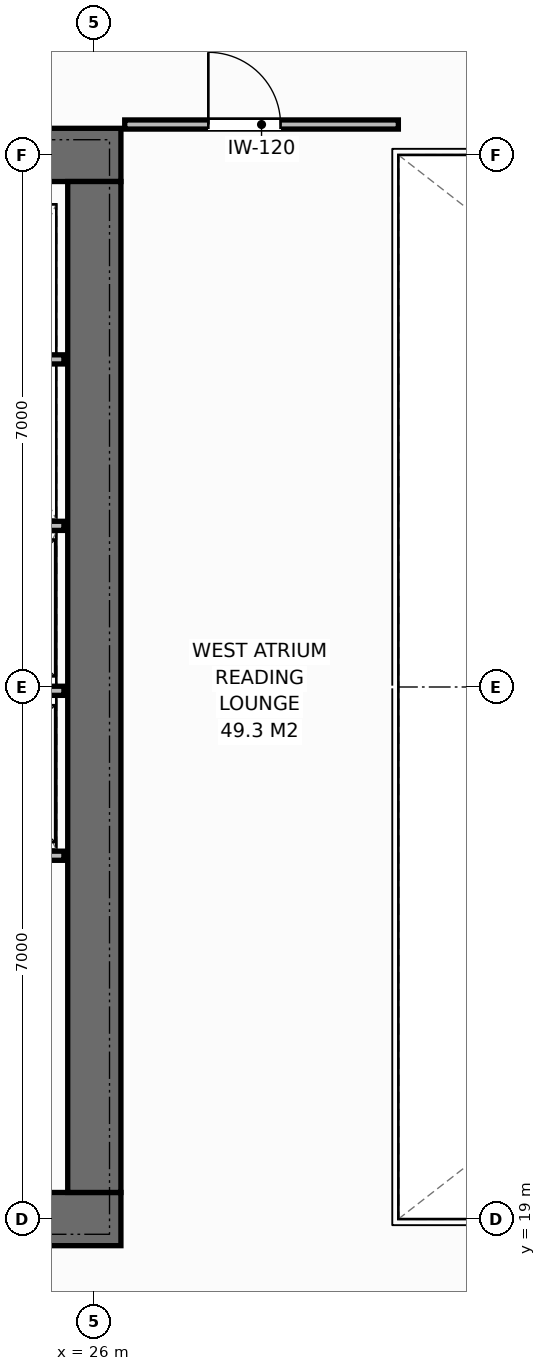
"""IFC4 building model, lengths in metres.
Left out: names, types, materials, properties, quantities, classifications, styles, units other than length and angle.
Written with IfcOpenShell. Run it as: python <this file> out.ifc"""

import sys

from ifc_helpers import new_model, si_unit, direction, frame, frame_2d, origin, place, context, subcontext, project, spatial, rectangle, extrude, element, fill, save


model = new_model("IFC4")
c1 = context("Model", 3, precision=1e-05, world=origin(), true_north=direction((0.0, 1.0)))
c2 = subcontext(c1, "Body", "Model", "MODEL_VIEW")
j1 = project(units=[si_unit("LENGTHUNIT", "METRE"), si_unit("PLANEANGLEUNIT", "RADIAN")], contexts=[c1])
p1 = place(None, origin())
s1 = spatial("IfcSite", under=j1, at=p1, CompositionType="ELEMENT")
p2 = place(p1, origin())
s2 = spatial("IfcBuilding", under=s1, at=p2, CompositionType="ELEMENT")
p3 = place(p2, frame((0.0, 0.0, 127.8)))
s3 = spatial("IfcBuildingStorey", under=s2, at=p3, CompositionType="ELEMENT", Elevation=127.8)
p4 = place(p3, frame((12.65, 19.0, 0.0), z_axis=(0.0, 0.0, 1.0), x_axis=(1.0, 0.0, 0.0)))
e1 = element("IfcWall", 1, at=p4, inside=s3, PredefinedType="SHEAR", context=c2, shape_type="SweptSolid", body=[
    extrude(rectangle(XDim=13.7, YDim=0.7, at=frame_2d((6.85, 0.0))), origin(), (0.0, 0.0, 1.0), 3.8),
])
p5 = place(p4, frame((9.23, 0.0, 0.0)))
e2 = element("IfcOpeningElement", 2, at=p5, cuts=e1, PredefinedType="OPENING", context=c2, shape_type="SweptSolid", body=[
    extrude(rectangle(XDim=1.4, YDim=2.2, at=frame_2d((0.7, 1.1))), frame((0.0, 0.36, 0.0), z_axis=(0.0, -1.0, 0.0), x_axis=(1.0, 0.0, 0.0)), (0.0, 0.0, 1.0), 0.72),
])
p6 = place(p3, frame((12.65, 33.0, 0.0), z_axis=(0.0, 0.0, 1.0), x_axis=(1.0, 0.0, 0.0)))
e3 = element("IfcWall", 3, at=p6, inside=s3, PredefinedType="SHEAR", context=c2, shape_type="SweptSolid", body=[
    extrude(rectangle(XDim=13.7, YDim=0.7, at=frame_2d((6.85, 0.0))), origin(), (0.0, 0.0, 1.0), 3.8),
])
p7 = place(p6, frame((1.25, 0.0, 0.0)))
e4 = element("IfcOpeningElement", 4, at=p7, cuts=e3, PredefinedType="OPENING", context=c2, shape_type="SweptSolid", body=[
    extrude(rectangle(XDim=0.9, YDim=2.15, at=frame_2d((0.45, 1.075))), frame((0.0, 0.36, 0.0), z_axis=(0.0, -1.0, 0.0), x_axis=(1.0, 0.0, 0.0)), (0.0, 0.0, 1.0), 0.72),
])
p8 = place(p6, frame((3.3, 0.0, 0.0)))
e5 = element("IfcOpeningElement", 5, at=p8, cuts=e3, PredefinedType="OPENING", context=c2, shape_type="SweptSolid", body=[
    extrude(rectangle(XDim=0.95, YDim=2.15, at=frame_2d((0.475, 1.075))), frame((0.0, 0.36, 0.0), z_axis=(0.0, -1.0, 0.0), x_axis=(1.0, 0.0, 0.0)), (0.0, 0.0, 1.0), 0.72),
])
p9 = place(p6, frame((6.15, 0.0, 0.0)))
e6 = element("IfcOpeningElement", 6, at=p9, cuts=e3, PredefinedType="OPENING", context=c2, shape_type="SweptSolid", body=[
    extrude(rectangle(XDim=0.95, YDim=2.15, at=frame_2d((0.475, 1.075))), frame((0.0, 0.36, 0.0), z_axis=(0.0, -1.0, 0.0), x_axis=(1.0, 0.0, 0.0)), (0.0, 0.0, 1.0), 0.72),
])
p10 = place(p6, frame((9.23, 0.0, 0.0)))
e7 = element("IfcOpeningElement", 7, at=p10, cuts=e3, PredefinedType="OPENING", context=c2, shape_type="SweptSolid", body=[
    extrude(rectangle(XDim=1.4, YDim=2.2, at=frame_2d((0.7, 1.1))), frame((0.0, 0.36, 0.0), z_axis=(0.0, -1.0, 0.0), x_axis=(1.0, 0.0, 0.0)), (0.0, 0.0, 1.0), 0.72),
])
p11 = place(p3, frame((26.0, 19.35, 0.0), z_axis=(0.0, 0.0, 1.0), x_axis=(0.0, 1.0, 0.0)))
e8 = element("IfcWall", 8, at=p11, inside=s3, PredefinedType="SHEAR", context=c2, shape_type="SweptSolid", body=[
    extrude(rectangle(XDim=13.3, YDim=0.7, at=frame_2d((6.65, 0.0))), origin(), (0.0, 0.0, 1.0), 3.8),
])
for number, where, z_axis, x_axis in (
    (9, (23.4, 23.78, 0.0), (0.0, 0.0, 1.0), (1.0, 0.0, 0.0)),
    (10, (23.4, 25.95, 0.0), (0.0, 0.0, 1.0), (1.0, 0.0, 0.0)),
    (11, (23.4, 28.12, 0.0), (0.0, 0.0, 1.0), (1.0, 0.0, 0.0)),
    (12, (23.4, 30.31, 0.0), (0.0, 0.0, 1.0), (1.0, 0.0, 0.0)),
):
    element("IfcWall", number, at=place(p3, frame(where, z_axis=z_axis, x_axis=x_axis)), inside=s3, PredefinedType="PARTITIONING", context=c2, shape_type="SweptSolid", body=[
        extrude(rectangle(XDim=2.2, YDim=0.12, at=frame_2d((1.1, 0.0))), origin(), (0.0, 0.0, 1.0), 3.565),
    ])
p12 = place(p3, frame((26.4, 33.4, 0.0), z_axis=(0.0, 0.0, 1.0), x_axis=(1.0, 0.0, 0.0)))
e13 = element("IfcWall", 13, at=p12, inside=s3, PredefinedType="PARTITIONING", context=c2, shape_type="SweptSolid", body=[
    extrude(rectangle(XDim=3.6, YDim=0.12, at=frame_2d((1.8, 0.0))), origin(), (0.0, 0.0, 1.0), 3.565),
])
p13 = place(p12, frame((1.1, 0.0, 0.0)))
e14 = element("IfcOpeningElement", 14, at=p13, cuts=e13, PredefinedType="OPENING", context=c2, shape_type="SweptSolid", body=[
    extrude(rectangle(XDim=0.95, YDim=2.15, at=frame_2d((0.475, 1.075))), frame((0.0, 0.07, 0.0), z_axis=(0.0, -1.0, 0.0), x_axis=(1.0, 0.0, 0.0)), (0.0, 0.0, 1.0), 0.14),
])
p14 = place(p13, origin())
e15 = element("IfcDoor", 15, at=p14, inside=s3, OperationType="SINGLE_SWING_LEFT", PredefinedType="DOOR", context=c2, shape_type="SweptSolid", body=[
    extrude(rectangle(XDim=0.95, YDim=2.15, at=frame_2d((0.475, 1.075))), frame((0.0, 0.025, 0.0), z_axis=(0.0, -1.0, 0.0), x_axis=(1.0, 0.0, 0.0)), (0.0, 0.0, 1.0), 0.05),
])
fill(e14, e15)
save(model, sys.argv[1])
